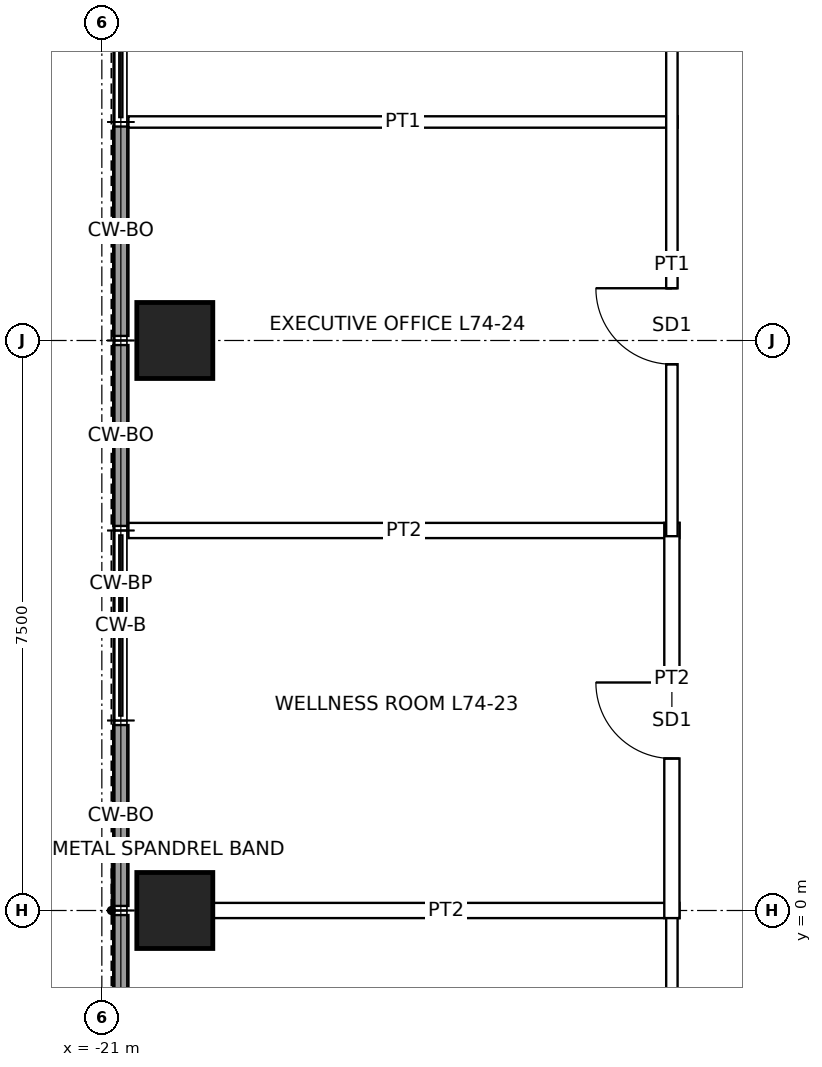
"""IFC4 building model, lengths in metres.
Left out: names, types, materials, properties, quantities, classifications, styles, units other than length and angle.
Written with IfcOpenShell. Run it as: python <this file> out.ifc"""

import sys

from ifc_helpers import new_model, si_unit, direction, frame, frame_2d, origin, origin_2d, place, context, subcontext, project, spatial, rectangle, hollow_rectangle, extrude, element, fill, save


model = new_model("IFC4")
c1 = context("Model", 3, precision=1e-05, world=origin(), true_north=direction((0.0, 1.0)))
c2 = subcontext(c1, "Body", "Model", "MODEL_VIEW")
j1 = project(units=[si_unit("LENGTHUNIT", "METRE"), si_unit("PLANEANGLEUNIT", "RADIAN")], contexts=[c1])
p1 = place(None, origin())
s1 = spatial("IfcSite", under=j1, at=p1, CompositionType="ELEMENT")
p2 = place(p1, origin())
s2 = spatial("IfcBuilding", under=s1, at=p2, CompositionType="ELEMENT")
p3 = place(p2, frame((0.0, 0.0, 331.9)))
s3 = spatial("IfcBuildingStorey", under=s2, at=p3, CompositionType="ELEMENT", Elevation=331.9)
for number, where, z_axis, x_axis in (
    (1, (-20.04, 0.0, 0.0), (0.0, 0.0, 1.0), (1.0, 0.0, 0.0)),
    (2, (-20.04, 7.5, 0.0), (0.0, 0.0, 1.0), (1.0, 0.0, 0.0)),
):
    element("IfcColumn", number, at=place(p3, frame(where, z_axis=z_axis, x_axis=x_axis)), inside=s3, PredefinedType="COLUMN", context=c2, shape_type="SweptSolid", body=[
        extrude(hollow_rectangle(XDim=1.0, YDim=1.0, WallThickness=0.075, at=origin_2d()), origin(), (0.0, 0.0, 1.0), 4.0),
    ])
for number, where, z_axis, x_axis in (
    (3, (-20.75, -2.44, 0.0), (0.0, 0.0, 1.0), (0.0, 1.0, 0.0)),
    (4, (-20.75, 0.06, 0.0), (0.0, 0.0, 1.0), (0.0, 1.0, 0.0)),
    (5, (-20.75, 5.06, 0.0), (0.0, 0.0, 1.0), (0.0, 1.0, 0.0)),
):
    element("IfcWall", number, at=place(p3, frame(where, z_axis=z_axis, x_axis=x_axis)), inside=s3, PredefinedType="SOLIDWALL", context=c2, shape_type="SweptSolid", body=[
        extrude(rectangle(XDim=2.38, YDim=0.2, at=frame_2d((1.19, 0.0))), origin(), (0.0, 0.0, 1.0), 3.8),
    ])
p4 = place(p3, frame((-20.75, 7.56, 0.0), z_axis=(0.0, 0.0, 1.0), x_axis=(0.0, 1.0, 0.0)))
e6 = element("IfcWall", 6, at=p4, inside=s3, PredefinedType="SOLIDWALL", context=c2, shape_type="SweptSolid", body=[
    extrude(rectangle(XDim=2.755, YDim=0.2, at=frame_2d((1.377, 0.0))), origin(), (0.0, 0.0, 1.0), 3.8),
])
p5 = place(p3, frame((-19.54, 0.0, 0.0), z_axis=(0.0, 0.0, 1.0), x_axis=(1.0, 0.0, 0.0)))
e7 = element("IfcWall", 7, at=p5, inside=s3, PredefinedType="PARTITIONING", context=c2, shape_type="SweptSolid", body=[
    extrude(rectangle(XDim=6.14, YDim=0.2, at=frame_2d((3.07, 0.0))), origin(), (0.0, 0.0, 1.0), 2.769),
])
p6 = place(p3, frame((-20.65, 5.0, 0.0), z_axis=(0.0, 0.0, 1.0), x_axis=(1.0, 0.0, 0.0)))
e8 = element("IfcWall", 8, at=p6, inside=s3, PredefinedType="PARTITIONING", context=c2, shape_type="SweptSolid", body=[
    extrude(rectangle(XDim=7.25, YDim=0.2, at=frame_2d((3.625, 0.0))), origin(), (0.0, 0.0, 1.0), 3.8),
])
p7 = place(p3, frame((-20.65, 10.375, 0.0), z_axis=(0.0, 0.0, 1.0), x_axis=(1.0, 0.0, 0.0)))
e9 = element("IfcWall", 9, at=p7, inside=s3, PredefinedType="PARTITIONING", context=c2, shape_type="SweptSolid", body=[
    extrude(rectangle(XDim=7.225, YDim=0.15, at=frame_2d((3.612, 0.0))), origin(), (0.0, 0.0, 1.0), 3.8),
])
p8 = place(p3, frame((-13.5, -5.075, 0.0), z_axis=(0.0, 0.0, 1.0), x_axis=(0.0, 1.0, 0.0)))
e10 = element("IfcWall", 10, at=p8, inside=s3, PredefinedType="PARTITIONING", context=c2, shape_type="SweptSolid", body=[
    extrude(rectangle(XDim=5.15, YDim=0.15, at=frame_2d((2.575, 0.0))), origin(), (0.0, 0.0, 1.0), 3.8),
])
p9 = place(p8, frame((2.075, 0.0, 0.0)))
e11 = element("IfcOpeningElement", 11, at=p9, cuts=e10, PredefinedType="OPENING", context=c2, shape_type="SweptSolid", body=[
    extrude(rectangle(XDim=1.0, YDim=2.4, at=frame_2d((0.5, 1.2))), frame((0.0, 0.085, 0.0), z_axis=(0.0, -1.0, 0.0), x_axis=(1.0, 0.0, 0.0)), (0.0, 0.0, 1.0), 0.17),
])
p10 = place(p3, frame((-13.5, -0.1, 0.0), z_axis=(0.0, 0.0, 1.0), x_axis=(0.0, 1.0, 0.0)))
e12 = element("IfcWall", 12, at=p10, inside=s3, PredefinedType="PARTITIONING", context=c2, shape_type="SweptSolid", body=[
    extrude(rectangle(XDim=5.2, YDim=0.2, at=frame_2d((2.6, 0.0))), origin(), (0.0, 0.0, 1.0), 3.8),
])
p11 = place(p10, frame((2.1, 0.0, 0.0)))
e13 = element("IfcOpeningElement", 13, at=p11, cuts=e12, PredefinedType="OPENING", context=c2, shape_type="SweptSolid", body=[
    extrude(rectangle(XDim=1.0, YDim=2.4, at=frame_2d((0.5, 1.2))), frame((0.0, 0.11, 0.0), z_axis=(0.0, -1.0, 0.0), x_axis=(1.0, 0.0, 0.0)), (0.0, 0.0, 1.0), 0.22),
])
p12 = place(p3, frame((-13.5, 4.925, 0.0), z_axis=(0.0, 0.0, 1.0), x_axis=(0.0, 1.0, 0.0)))
e14 = element("IfcWall", 14, at=p12, inside=s3, PredefinedType="PARTITIONING", context=c2, shape_type="SweptSolid", body=[
    extrude(rectangle(XDim=7.15, YDim=0.15, at=frame_2d((3.575, 0.0))), origin(), (0.0, 0.0, 1.0), 3.8),
])
p13 = place(p12, frame((2.262, 0.0, 0.0)))
e15 = element("IfcOpeningElement", 15, at=p13, cuts=e14, PredefinedType="OPENING", context=c2, shape_type="SweptSolid", body=[
    extrude(rectangle(XDim=1.0, YDim=2.4, at=frame_2d((0.5, 1.2))), frame((0.0, 0.085, 0.0), z_axis=(0.0, -1.0, 0.0), x_axis=(1.0, 0.0, 0.0)), (0.0, 0.0, 1.0), 0.17),
])
p14 = place(p11, origin())
e16 = element("IfcDoor", 16, at=p14, inside=s3, OperationType="SINGLE_SWING_RIGHT", PredefinedType="DOOR", context=c2, shape_type="SweptSolid", body=[
    extrude(rectangle(XDim=1.0, YDim=2.4, at=frame_2d((0.5, 1.2))), frame((0.0, 0.025, 0.0), z_axis=(0.0, -1.0, 0.0), x_axis=(1.0, 0.0, 0.0)), (0.0, 0.0, 1.0), 0.05),
])
fill(e13, e16)
p15 = place(p13, origin())
e17 = element("IfcDoor", 17, at=p15, inside=s3, OperationType="SINGLE_SWING_RIGHT", PredefinedType="DOOR", context=c2, shape_type="SweptSolid", body=[
    extrude(rectangle(XDim=1.0, YDim=2.4, at=frame_2d((0.5, 1.2))), frame((0.0, 0.025, 0.0), z_axis=(0.0, -1.0, 0.0), x_axis=(1.0, 0.0, 0.0)), (0.0, 0.0, 1.0), 0.05),
])
fill(e15, e17)
save(model, sys.argv[1])
